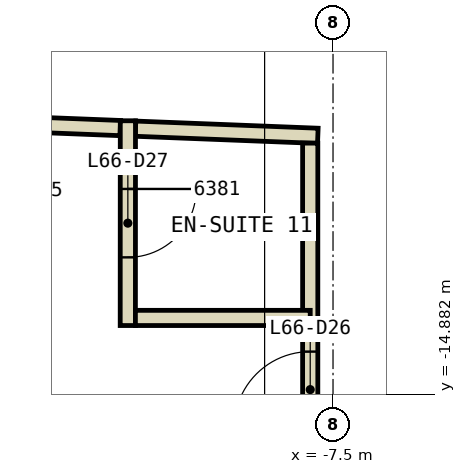
"""IFC4 building model, lengths in metres.
Left out: names, types, materials, properties, quantities, classifications, styles, units other than length and angle.
Written with IfcOpenShell. Run it as: python <this file> out.ifc"""

import sys

from ifc_helpers import new_model, si_unit, direction, frame, frame_2d, origin, place, context, subcontext, project, spatial, rectangle, extrude, element, fill, save


model = new_model("IFC4")
c1 = context("Model", 3, precision=1e-05, world=origin(), true_north=direction((0.0, 1.0)))
c2 = subcontext(c1, "Body", "Model", "MODEL_VIEW")
j1 = project(units=[si_unit("LENGTHUNIT", "METRE"), si_unit("PLANEANGLEUNIT", "RADIAN")], contexts=[c1])
p1 = place(None, origin())
s1 = spatial("IfcSite", under=j1, at=p1, CompositionType="ELEMENT")
p2 = place(p1, origin())
s2 = spatial("IfcBuilding", under=s1, at=p2, CompositionType="ELEMENT")
p3 = place(p2, frame((0.0, 0.0, 286.4)))
s3 = spatial("IfcBuildingStorey", under=s2, at=p3, CompositionType="ELEMENT", Elevation=286.4)
p4 = place(p3, frame((-10.299, -11.378, 0.0), z_axis=(0.0, 0.0, 1.0), x_axis=(-0.999237995813, 0.03903111224, 0.0)))
e1 = element("IfcWall", 1, at=p4, inside=s3, PredefinedType="PARTITIONING", context=c2, shape_type="SweptSolid", body=[
    extrude(rectangle(XDim=1.176, YDim=0.2, at=frame_2d((0.588, 0.0))), origin(), (0.0, 0.0, 1.0), 3.26),
])
p5 = place(p3, frame((-7.7, -11.48, 0.0), z_axis=(0.0, 0.0, 1.0), x_axis=(-0.999233433291, 0.039147743138, 0.0)))
e2 = element("IfcWall", 2, at=p5, inside=s3, PredefinedType="PARTITIONING", context=c2, shape_type="SweptSolid", body=[
    extrude(rectangle(XDim=2.401, YDim=0.2, at=frame_2d((1.201, 0.0))), origin(), (0.0, 0.0, 1.0), 3.26),
])
p6 = place(p3, frame((-7.8, -15.761, 0.0), z_axis=(0.0, 0.0, 1.0), x_axis=(0.0, 1.0, 0.0)))
e3 = element("IfcWall", 3, at=p6, inside=s3, PredefinedType="PARTITIONING", context=c2, shape_type="SweptSolid", body=[
    extrude(rectangle(XDim=1.785, YDim=0.2, at=frame_2d((0.893, 0.0))), origin(), (0.0, 0.0, 1.0), 3.26),
])
p7 = place(p6, frame((0.442, 0.0, 0.0)))
e4 = element("IfcOpeningElement", 4, at=p7, cuts=e3, PredefinedType="OPENING", context=c2, shape_type="SweptSolid", body=[
    extrude(rectangle(XDim=1.0, YDim=2.1, at=frame_2d((0.5, 1.05))), frame((0.0, 0.11, 0.0), z_axis=(0.0, -1.0, 0.0), x_axis=(1.0, 0.0, 0.0)), (0.0, 0.0, 1.0), 0.22),
])
p8 = place(p3, frame((-7.8, -13.976, 0.0), z_axis=(0.0, 0.0, 1.0), x_axis=(0.0, 1.0, 0.0)))
e5 = element("IfcWall", 5, at=p8, inside=s3, PredefinedType="PARTITIONING", context=c2, shape_type="SweptSolid", body=[
    extrude(rectangle(XDim=2.4, YDim=0.2, at=frame_2d((1.2, 0.0))), origin(), (0.0, 0.0, 1.0), 3.26),
])
p9 = place(p3, frame((-10.199, -11.282, 0.0), z_axis=(0.0, 0.0, 1.0), x_axis=(-0.000362482985, -0.999999934303, 0.0)))
e6 = element("IfcWall", 6, at=p9, inside=s3, PredefinedType="PARTITIONING", context=c2, shape_type="SweptSolid", body=[
    extrude(rectangle(XDim=2.694, YDim=0.2, at=frame_2d((1.347, 0.0))), origin(), (0.0, 0.0, 1.0), 3.26),
])
p10 = place(p9, frame((0.897, 0.0, 0.0)))
e7 = element("IfcOpeningElement", 7, at=p10, cuts=e6, PredefinedType="OPENING", context=c2, shape_type="SweptSolid", body=[
    extrude(rectangle(XDim=0.9, YDim=2.1, at=frame_2d((0.45, 1.05))), frame((0.0, 0.11, 0.0), z_axis=(0.0, -1.0, 0.0), x_axis=(1.0, 0.0, 0.0)), (0.0, 0.0, 1.0), 0.22),
])
p11 = place(p3, frame((-10.1, -13.876, 0.0), z_axis=(0.0, 0.0, 1.0), x_axis=(1.0, 0.0, 0.0)))
e8 = element("IfcWall", 8, at=p11, inside=s3, PredefinedType="PARTITIONING", context=c2, shape_type="SweptSolid", body=[
    extrude(rectangle(XDim=2.3, YDim=0.2, at=frame_2d((1.15, 0.0))), origin(), (0.0, 0.0, 1.0), 3.26),
])
p12 = place(p7, origin())
e9 = element("IfcDoor", 9, at=p12, inside=s3, OperationType="SINGLE_SWING_RIGHT", PredefinedType="DOOR", context=c2, shape_type="SweptSolid", body=[
    extrude(rectangle(XDim=1.0, YDim=2.1, at=frame_2d((0.5, 1.05))), frame((0.0, 0.025, 0.0), z_axis=(0.0, -1.0, 0.0), x_axis=(1.0, 0.0, 0.0)), (0.0, 0.0, 1.0), 0.05),
])
fill(e4, e9)
p13 = place(p10, origin())
e10 = element("IfcDoor", 10, at=p13, inside=s3, OperationType="SINGLE_SWING_LEFT", PredefinedType="DOOR", context=c2, shape_type="SweptSolid", body=[
    extrude(rectangle(XDim=0.9, YDim=2.1, at=frame_2d((0.45, 1.05))), frame((0.0, 0.025, 0.0), z_axis=(0.0, -1.0, 0.0), x_axis=(1.0, 0.0, 0.0)), (0.0, 0.0, 1.0), 0.05),
])
fill(e7, e10)
save(model, sys.argv[1])
